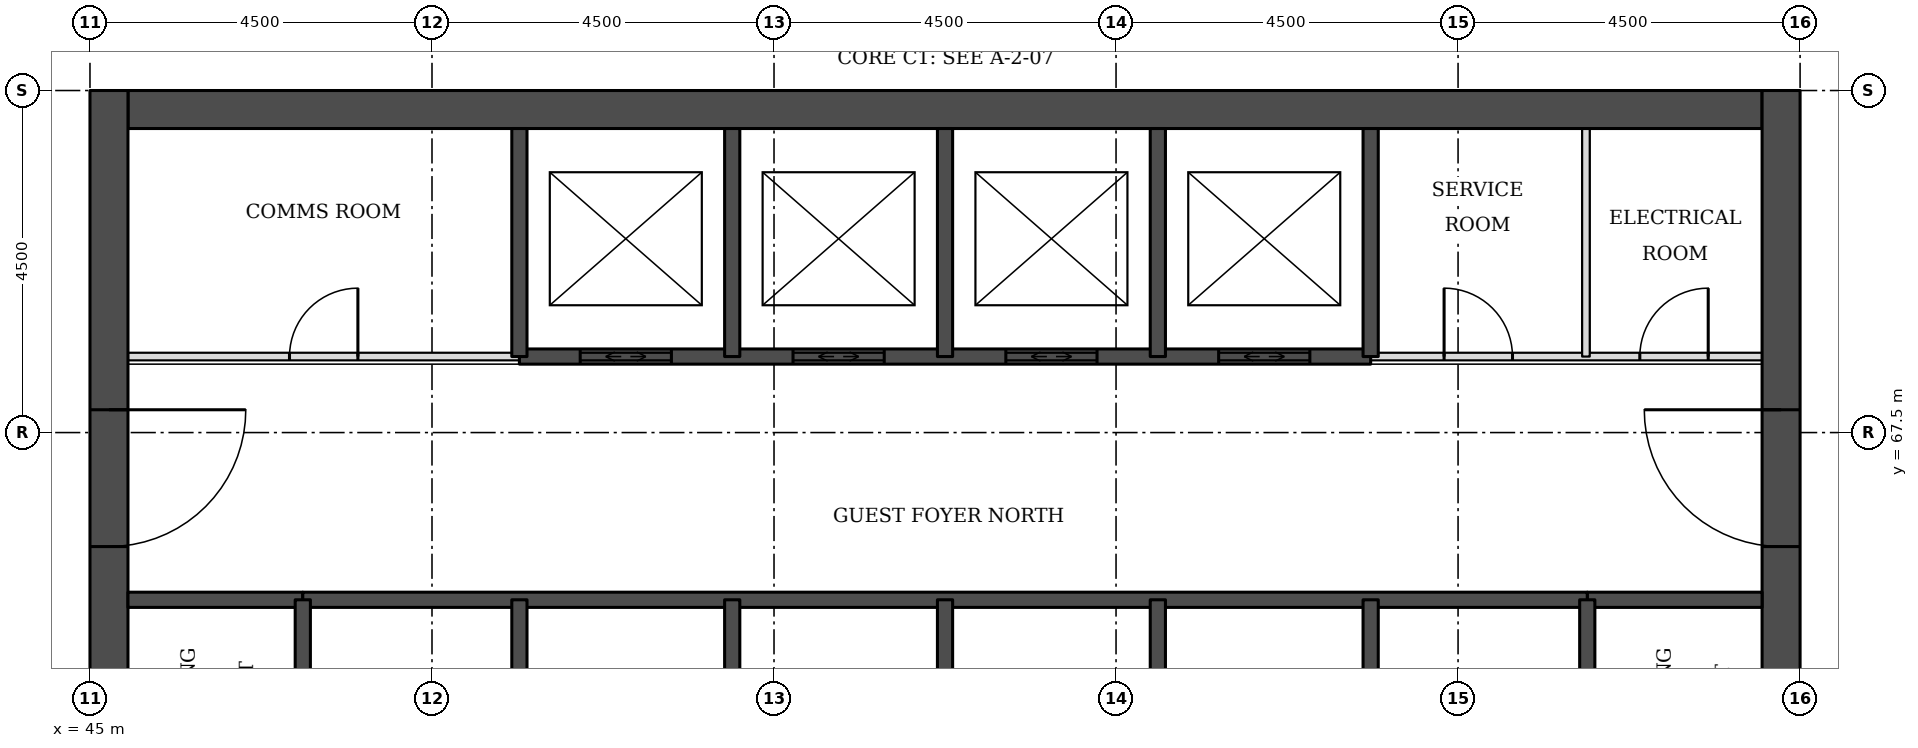
"""IFC4 building model, lengths in metres.
Left out: names, types, materials, properties, quantities, classifications, styles, units other than length and angle.
Written with IfcOpenShell. Run it as: python <this file> out.ifc"""

import sys

from ifc_helpers import new_model, si_unit, direction, frame, frame_2d, origin, place, context, subcontext, project, spatial, rectangle, extrude, element, fill, save


model = new_model("IFC4")
c1 = context("Model", 3, precision=1e-05, world=origin(), true_north=direction((0.0, 1.0)))
c2 = subcontext(c1, "Body", "Model", "MODEL_VIEW")
j1 = project(units=[si_unit("LENGTHUNIT", "METRE"), si_unit("PLANEANGLEUNIT", "RADIAN")], contexts=[c1])
p1 = place(None, origin())
s1 = spatial("IfcSite", under=j1, at=p1, CompositionType="ELEMENT")
p2 = place(p1, origin())
s2 = spatial("IfcBuilding", under=s1, at=p2, CompositionType="ELEMENT")
p3 = place(p2, frame((0.0, 0.0, 23.1)))
s3 = spatial("IfcBuildingStorey", under=s2, at=p3, CompositionType="ELEMENT", Elevation=23.1)
p4 = place(p3, frame((45.5, 71.75, 0.0), z_axis=(0.0, 0.0, 1.0), x_axis=(1.0, 0.0, 0.0)))
e1 = element("IfcWall", 1, at=p4, inside=s3, PredefinedType="SHEAR", context=c2, shape_type="SweptSolid", body=[
    extrude(rectangle(XDim=21.5, YDim=0.5, at=frame_2d((10.75, 0.0))), origin(), (0.0, 0.0, 1.0), 3.3),
])
p5 = place(p3, frame((45.25, 49.5, 0.0), z_axis=(0.0, 0.0, 1.0), x_axis=(0.0, 1.0, 0.0)))
e2 = element("IfcWall", 2, at=p5, inside=s3, PredefinedType="SHEAR", context=c2, shape_type="SweptSolid", body=[
    extrude(rectangle(XDim=22.5, YDim=0.5, at=frame_2d((11.25, 0.0))), origin(), (0.0, 0.0, 1.0), 3.3),
])
p6 = place(p5, frame((4.2, 0.0, 0.0)))
e3 = element("IfcOpeningElement", 3, at=p6, cuts=e2, PredefinedType="OPENING", context=c2, shape_type="SweptSolid", body=[
    extrude(rectangle(XDim=1.8, YDim=2.1, at=frame_2d((0.9, 1.05))), frame((0.0, 0.26, 0.0), z_axis=(0.0, -1.0, 0.0), x_axis=(1.0, 0.0, 0.0)), (0.0, 0.0, 1.0), 0.52),
])
p7 = place(p5, frame((6.9, 0.0, 0.0)))
e4 = element("IfcOpeningElement", 4, at=p7, cuts=e2, PredefinedType="OPENING", context=c2, shape_type="SweptSolid", body=[
    extrude(rectangle(XDim=1.1, YDim=2.1, at=frame_2d((0.55, 1.05))), frame((0.0, 0.26, 0.0), z_axis=(0.0, -1.0, 0.0), x_axis=(1.0, 0.0, 0.0)), (0.0, 0.0, 1.0), 0.52),
])
p8 = place(p5, frame((13.6, 0.0, 0.0)))
e5 = element("IfcOpeningElement", 5, at=p8, cuts=e2, PredefinedType="OPENING", context=c2, shape_type="SweptSolid", body=[
    extrude(rectangle(XDim=1.1, YDim=2.1, at=frame_2d((0.55, 1.05))), frame((0.0, 0.26, 0.0), z_axis=(0.0, -1.0, 0.0), x_axis=(1.0, 0.0, 0.0)), (0.0, 0.0, 1.0), 0.52),
])
p9 = place(p5, frame((16.5, 0.0, 0.0)))
e6 = element("IfcOpeningElement", 6, at=p9, cuts=e2, PredefinedType="OPENING", context=c2, shape_type="SweptSolid", body=[
    extrude(rectangle(XDim=1.8, YDim=2.1, at=frame_2d((0.9, 1.05))), frame((0.0, 0.26, 0.0), z_axis=(0.0, -1.0, 0.0), x_axis=(1.0, 0.0, 0.0)), (0.0, 0.0, 1.0), 0.52),
])
p10 = place(p3, frame((67.25, 49.5, 0.0), z_axis=(0.0, 0.0, 1.0), x_axis=(0.0, 1.0, 0.0)))
e7 = element("IfcWall", 7, at=p10, inside=s3, PredefinedType="SHEAR", context=c2, shape_type="SweptSolid", body=[
    extrude(rectangle(XDim=22.5, YDim=0.5, at=frame_2d((11.25, 0.0))), origin(), (0.0, 0.0, 1.0), 3.3),
])
p11 = place(p10, frame((4.2, 0.0, 0.0)))
e8 = element("IfcOpeningElement", 8, at=p11, cuts=e7, PredefinedType="OPENING", context=c2, shape_type="SweptSolid", body=[
    extrude(rectangle(XDim=1.8, YDim=2.1, at=frame_2d((0.9, 1.05))), frame((0.0, 0.26, 0.0), z_axis=(0.0, -1.0, 0.0), x_axis=(1.0, 0.0, 0.0)), (0.0, 0.0, 1.0), 0.52),
])
p12 = place(p10, frame((6.9, 0.0, 0.0)))
e9 = element("IfcOpeningElement", 9, at=p12, cuts=e7, PredefinedType="OPENING", context=c2, shape_type="SweptSolid", body=[
    extrude(rectangle(XDim=1.1, YDim=2.1, at=frame_2d((0.55, 1.05))), frame((0.0, 0.26, 0.0), z_axis=(0.0, -1.0, 0.0), x_axis=(1.0, 0.0, 0.0)), (0.0, 0.0, 1.0), 0.52),
])
p13 = place(p10, frame((13.6, 0.0, 0.0)))
e10 = element("IfcOpeningElement", 10, at=p13, cuts=e7, PredefinedType="OPENING", context=c2, shape_type="SweptSolid", body=[
    extrude(rectangle(XDim=1.1, YDim=2.1, at=frame_2d((0.55, 1.05))), frame((0.0, 0.26, 0.0), z_axis=(0.0, -1.0, 0.0), x_axis=(1.0, 0.0, 0.0)), (0.0, 0.0, 1.0), 0.52),
])
p14 = place(p10, frame((16.5, 0.0, 0.0)))
e11 = element("IfcOpeningElement", 11, at=p14, cuts=e7, PredefinedType="OPENING", context=c2, shape_type="SweptSolid", body=[
    extrude(rectangle(XDim=1.8, YDim=2.1, at=frame_2d((0.9, 1.05))), frame((0.0, 0.26, 0.0), z_axis=(0.0, -1.0, 0.0), x_axis=(1.0, 0.0, 0.0)), (0.0, 0.0, 1.0), 0.52),
])
for number, where, z_axis, x_axis in (
    (12, (45.5, 65.3, 0.0), (0.0, 0.0, 1.0), (1.0, 0.0, 0.0)),
    (13, (64.7, 65.3, 0.0), (0.0, 0.0, 1.0), (1.0, 0.0, 0.0)),
):
    element("IfcWall", number, at=place(p3, frame(where, z_axis=z_axis, x_axis=x_axis)), inside=s3, PredefinedType="SOLIDWALL", context=c2, shape_type="SweptSolid", body=[
        extrude(rectangle(XDim=2.3, YDim=0.2, at=frame_2d((1.15, 0.0))), origin(), (0.0, 0.0, 1.0), 3.08),
    ])
p15 = place(p3, frame((47.8, 65.3, 0.0), z_axis=(0.0, 0.0, 1.0), x_axis=(1.0, 0.0, 0.0)))
e14 = element("IfcWall", 14, at=p15, inside=s3, PredefinedType="SOLIDWALL", context=c2, shape_type="SweptSolid", body=[
    extrude(rectangle(XDim=16.9, YDim=0.2, at=frame_2d((8.45, 0.0))), origin(), (0.0, 0.0, 1.0), 3.08),
])
p16 = place(p3, frame((45.5, 68.5, 0.0), z_axis=(0.0, 0.0, 1.0), x_axis=(1.0, 0.0, 0.0)))
e15 = element("IfcWall", 15, at=p16, inside=s3, PredefinedType="PARTITIONING", context=c2, shape_type="SweptSolid", body=[
    extrude(rectangle(XDim=5.15, YDim=0.1, at=frame_2d((2.575, 0.0))), origin(), (0.0, 0.0, 1.0), 3.08),
])
p17 = place(p16, frame((2.125, 0.0, 0.0)))
e16 = element("IfcOpeningElement", 16, at=p17, cuts=e15, PredefinedType="OPENING", context=c2, shape_type="SweptSolid", body=[
    extrude(rectangle(XDim=0.9, YDim=2.1, at=frame_2d((0.45, 1.05))), frame((0.0, 0.06, 0.0), z_axis=(0.0, -1.0, 0.0), x_axis=(1.0, 0.0, 0.0)), (0.0, 0.0, 1.0), 0.12),
])
p18 = place(p3, frame((61.85, 68.5, 0.0), z_axis=(0.0, 0.0, 1.0), x_axis=(1.0, 0.0, 0.0)))
e17 = element("IfcWall", 17, at=p18, inside=s3, PredefinedType="PARTITIONING", context=c2, shape_type="SweptSolid", body=[
    extrude(rectangle(XDim=5.15, YDim=0.1, at=frame_2d((2.575, 0.0))), origin(), (0.0, 0.0, 1.0), 3.08),
])
p19 = place(p18, frame((3.541, 0.0, 0.0)))
e18 = element("IfcOpeningElement", 18, at=p19, cuts=e17, PredefinedType="OPENING", context=c2, shape_type="SweptSolid", body=[
    extrude(rectangle(XDim=0.9, YDim=2.1, at=frame_2d((0.45, 1.05))), frame((0.0, 0.06, 0.0), z_axis=(0.0, -1.0, 0.0), x_axis=(1.0, 0.0, 0.0)), (0.0, 0.0, 1.0), 0.12),
])
p20 = place(p18, frame((0.966, 0.0, 0.0)))
e19 = element("IfcOpeningElement", 19, at=p20, cuts=e17, PredefinedType="OPENING", context=c2, shape_type="SweptSolid", body=[
    extrude(rectangle(XDim=0.9, YDim=2.1, at=frame_2d((0.45, 1.05))), frame((0.0, 0.06, 0.0), z_axis=(0.0, -1.0, 0.0), x_axis=(1.0, 0.0, 0.0)), (0.0, 0.0, 1.0), 0.12),
])
p21 = place(p3, frame((50.65, 68.5, 0.0), z_axis=(0.0, 0.0, 1.0), x_axis=(1.0, 0.0, 0.0)))
e20 = element("IfcWall", 20, at=p21, inside=s3, PredefinedType="SOLIDWALL", context=c2, shape_type="SweptSolid", body=[
    extrude(rectangle(XDim=11.2, YDim=0.2, at=frame_2d((5.6, 0.0))), origin(), (0.0, 0.0, 1.0), 3.08),
])
p22 = place(p21, frame((0.8, 0.0, 0.0)))
e21 = element("IfcOpeningElement", 21, at=p22, cuts=e20, PredefinedType="OPENING", context=c2, shape_type="SweptSolid", body=[
    extrude(rectangle(XDim=1.2, YDim=2.1, at=frame_2d((0.6, 1.05))), frame((0.0, 0.11, 0.0), z_axis=(0.0, -1.0, 0.0), x_axis=(1.0, 0.0, 0.0)), (0.0, 0.0, 1.0), 0.22),
])
p23 = place(p21, frame((3.6, 0.0, 0.0)))
e22 = element("IfcOpeningElement", 22, at=p23, cuts=e20, PredefinedType="OPENING", context=c2, shape_type="SweptSolid", body=[
    extrude(rectangle(XDim=1.2, YDim=2.1, at=frame_2d((0.6, 1.05))), frame((0.0, 0.11, 0.0), z_axis=(0.0, -1.0, 0.0), x_axis=(1.0, 0.0, 0.0)), (0.0, 0.0, 1.0), 0.22),
])
p24 = place(p21, frame((6.4, 0.0, 0.0)))
e23 = element("IfcOpeningElement", 23, at=p24, cuts=e20, PredefinedType="OPENING", context=c2, shape_type="SweptSolid", body=[
    extrude(rectangle(XDim=1.2, YDim=2.1, at=frame_2d((0.6, 1.05))), frame((0.0, 0.11, 0.0), z_axis=(0.0, -1.0, 0.0), x_axis=(1.0, 0.0, 0.0)), (0.0, 0.0, 1.0), 0.22),
])
p25 = place(p21, frame((9.2, 0.0, 0.0)))
e24 = element("IfcOpeningElement", 24, at=p25, cuts=e20, PredefinedType="OPENING", context=c2, shape_type="SweptSolid", body=[
    extrude(rectangle(XDim=1.2, YDim=2.1, at=frame_2d((0.6, 1.05))), frame((0.0, 0.11, 0.0), z_axis=(0.0, -1.0, 0.0), x_axis=(1.0, 0.0, 0.0)), (0.0, 0.0, 1.0), 0.22),
])
p26 = place(p3, frame((47.8, 62.0, 0.0), z_axis=(0.0, 0.0, 1.0), x_axis=(0.0, 1.0, 0.0)))
e25 = element("IfcWall", 25, at=p26, inside=s3, PredefinedType="SOLIDWALL", context=c2, shape_type="SweptSolid", body=[
    extrude(rectangle(XDim=3.3, YDim=0.2, at=frame_2d((1.65, 0.0))), origin(), (0.0, 0.0, 1.0), 3.08),
])
p27 = place(p26, frame((1.1, 0.0, 0.0)))
e26 = element("IfcOpeningElement", 26, at=p27, cuts=e25, PredefinedType="OPENING", context=c2, shape_type="SweptSolid", body=[
    extrude(rectangle(XDim=1.1, YDim=2.1, at=frame_2d((0.55, 1.05))), frame((0.0, 0.11, 0.0), z_axis=(0.0, -1.0, 0.0), x_axis=(1.0, 0.0, 0.0)), (0.0, 0.0, 1.0), 0.22),
])
p28 = place(p3, frame((50.65, 62.0, 0.0), z_axis=(0.0, 0.0, 1.0), x_axis=(0.0, 1.0, 0.0)))
e27 = element("IfcWall", 27, at=p28, inside=s3, PredefinedType="SOLIDWALL", context=c2, shape_type="SweptSolid", body=[
    extrude(rectangle(XDim=3.3, YDim=0.2, at=frame_2d((1.65, 0.0))), origin(), (0.0, 0.0, 1.0), 3.08),
])
p29 = place(p3, frame((50.65, 68.5, 0.0), z_axis=(0.0, 0.0, 1.0), x_axis=(0.0, 1.0, 0.0)))
e28 = element("IfcWall", 28, at=p29, inside=s3, PredefinedType="SOLIDWALL", context=c2, shape_type="SweptSolid", body=[
    extrude(rectangle(XDim=3.0, YDim=0.2, at=frame_2d((1.5, 0.0))), origin(), (0.0, 0.0, 1.0), 3.08),
])
p30 = place(p3, frame((53.45, 62.5, 0.0), z_axis=(0.0, 0.0, 1.0), x_axis=(0.0, 1.0, 0.0)))
e29 = element("IfcWall", 29, at=p30, inside=s3, PredefinedType="SOLIDWALL", context=c2, shape_type="SweptSolid", body=[
    extrude(rectangle(XDim=2.8, YDim=0.2, at=frame_2d((1.4, 0.0))), origin(), (0.0, 0.0, 1.0), 3.08),
])
p31 = place(p3, frame((53.45, 68.5, 0.0), z_axis=(0.0, 0.0, 1.0), x_axis=(0.0, 1.0, 0.0)))
e30 = element("IfcWall", 30, at=p31, inside=s3, PredefinedType="SOLIDWALL", context=c2, shape_type="SweptSolid", body=[
    extrude(rectangle(XDim=3.0, YDim=0.2, at=frame_2d((1.5, 0.0))), origin(), (0.0, 0.0, 1.0), 3.08),
])
p32 = place(p3, frame((56.25, 62.5, 0.0), z_axis=(0.0, 0.0, 1.0), x_axis=(0.0, 1.0, 0.0)))
e31 = element("IfcWall", 31, at=p32, inside=s3, PredefinedType="SOLIDWALL", context=c2, shape_type="SweptSolid", body=[
    extrude(rectangle(XDim=2.8, YDim=0.2, at=frame_2d((1.4, 0.0))), origin(), (0.0, 0.0, 1.0), 3.08),
])
p33 = place(p3, frame((56.25, 68.5, 0.0), z_axis=(0.0, 0.0, 1.0), x_axis=(0.0, 1.0, 0.0)))
e32 = element("IfcWall", 32, at=p33, inside=s3, PredefinedType="SOLIDWALL", context=c2, shape_type="SweptSolid", body=[
    extrude(rectangle(XDim=3.0, YDim=0.2, at=frame_2d((1.5, 0.0))), origin(), (0.0, 0.0, 1.0), 3.08),
])
p34 = place(p3, frame((59.05, 62.5, 0.0), z_axis=(0.0, 0.0, 1.0), x_axis=(0.0, 1.0, 0.0)))
e33 = element("IfcWall", 33, at=p34, inside=s3, PredefinedType="SOLIDWALL", context=c2, shape_type="SweptSolid", body=[
    extrude(rectangle(XDim=2.8, YDim=0.2, at=frame_2d((1.4, 0.0))), origin(), (0.0, 0.0, 1.0), 3.08),
])
p35 = place(p3, frame((59.05, 68.5, 0.0), z_axis=(0.0, 0.0, 1.0), x_axis=(0.0, 1.0, 0.0)))
e34 = element("IfcWall", 34, at=p35, inside=s3, PredefinedType="SOLIDWALL", context=c2, shape_type="SweptSolid", body=[
    extrude(rectangle(XDim=3.0, YDim=0.2, at=frame_2d((1.5, 0.0))), origin(), (0.0, 0.0, 1.0), 3.08),
])
p36 = place(p3, frame((61.85, 62.0, 0.0), z_axis=(0.0, 0.0, 1.0), x_axis=(0.0, 1.0, 0.0)))
e35 = element("IfcWall", 35, at=p36, inside=s3, PredefinedType="SOLIDWALL", context=c2, shape_type="SweptSolid", body=[
    extrude(rectangle(XDim=3.3, YDim=0.2, at=frame_2d((1.65, 0.0))), origin(), (0.0, 0.0, 1.0), 3.08),
])
p37 = place(p3, frame((61.85, 68.5, 0.0), z_axis=(0.0, 0.0, 1.0), x_axis=(0.0, 1.0, 0.0)))
e36 = element("IfcWall", 36, at=p37, inside=s3, PredefinedType="SOLIDWALL", context=c2, shape_type="SweptSolid", body=[
    extrude(rectangle(XDim=3.0, YDim=0.2, at=frame_2d((1.5, 0.0))), origin(), (0.0, 0.0, 1.0), 3.08),
])
p38 = place(p3, frame((64.683, 68.5, 0.0), z_axis=(0.0, 0.0, 1.0), x_axis=(0.0, 1.0, 0.0)))
e37 = element("IfcWall", 37, at=p38, inside=s3, PredefinedType="PARTITIONING", context=c2, shape_type="SweptSolid", body=[
    extrude(rectangle(XDim=3.0, YDim=0.1, at=frame_2d((1.5, 0.0))), origin(), (0.0, 0.0, 1.0), 3.08),
])
p39 = place(p3, frame((64.7, 62.0, 0.0), z_axis=(0.0, 0.0, 1.0), x_axis=(0.0, 1.0, 0.0)))
e38 = element("IfcWall", 38, at=p39, inside=s3, PredefinedType="SOLIDWALL", context=c2, shape_type="SweptSolid", body=[
    extrude(rectangle(XDim=3.3, YDim=0.2, at=frame_2d((1.65, 0.0))), origin(), (0.0, 0.0, 1.0), 3.08),
])
p40 = place(p39, frame((1.1, 0.0, 0.0)))
e39 = element("IfcOpeningElement", 39, at=p40, cuts=e38, PredefinedType="OPENING", context=c2, shape_type="SweptSolid", body=[
    extrude(rectangle(XDim=1.1, YDim=2.1, at=frame_2d((0.55, 1.05))), frame((0.0, 0.11, 0.0), z_axis=(0.0, -1.0, 0.0), x_axis=(1.0, 0.0, 0.0)), (0.0, 0.0, 1.0), 0.22),
])
p41 = place(p22, origin())
e40 = element("IfcDoor", 40, at=p41, inside=s3, OperationType="DOUBLE_DOOR_SLIDING", PredefinedType="DOOR", context=c2, shape_type="SweptSolid", body=[
    extrude(rectangle(XDim=1.2, YDim=2.1, at=frame_2d((0.6, 1.05))), frame((0.0, 0.025, 0.0), z_axis=(0.0, -1.0, 0.0), x_axis=(1.0, 0.0, 0.0)), (0.0, 0.0, 1.0), 0.05),
])
fill(e21, e40)
p42 = place(p23, origin())
e41 = element("IfcDoor", 41, at=p42, inside=s3, OperationType="DOUBLE_DOOR_SLIDING", PredefinedType="DOOR", context=c2, shape_type="SweptSolid", body=[
    extrude(rectangle(XDim=1.2, YDim=2.1, at=frame_2d((0.6, 1.05))), frame((0.0, 0.025, 0.0), z_axis=(0.0, -1.0, 0.0), x_axis=(1.0, 0.0, 0.0)), (0.0, 0.0, 1.0), 0.05),
])
fill(e22, e41)
p43 = place(p24, origin())
e42 = element("IfcDoor", 42, at=p43, inside=s3, OperationType="DOUBLE_DOOR_SLIDING", PredefinedType="DOOR", context=c2, shape_type="SweptSolid", body=[
    extrude(rectangle(XDim=1.2, YDim=2.1, at=frame_2d((0.6, 1.05))), frame((0.0, 0.025, 0.0), z_axis=(0.0, -1.0, 0.0), x_axis=(1.0, 0.0, 0.0)), (0.0, 0.0, 1.0), 0.05),
])
fill(e23, e42)
p44 = place(p25, origin())
e43 = element("IfcDoor", 43, at=p44, inside=s3, OperationType="DOUBLE_DOOR_SLIDING", PredefinedType="DOOR", context=c2, shape_type="SweptSolid", body=[
    extrude(rectangle(XDim=1.2, YDim=2.1, at=frame_2d((0.6, 1.05))), frame((0.0, 0.025, 0.0), z_axis=(0.0, -1.0, 0.0), x_axis=(1.0, 0.0, 0.0)), (0.0, 0.0, 1.0), 0.05),
])
fill(e24, e43)
p45 = place(p9, frame((1.8, 0.0, 0.0), z_axis=(0.0, 0.0, 1.0), x_axis=(-1.0, 0.0, 0.0)))
e44 = element("IfcDoor", 44, at=p45, inside=s3, OperationType="SINGLE_SWING_LEFT", PredefinedType="DOOR", context=c2, shape_type="SweptSolid", body=[
    extrude(rectangle(XDim=1.8, YDim=2.1, at=frame_2d((0.9, 1.05))), frame((0.0, 0.025, 0.0), z_axis=(0.0, -1.0, 0.0), x_axis=(1.0, 0.0, 0.0)), (0.0, 0.0, 1.0), 0.05),
])
fill(e6, e44)
p46 = place(p14, origin())
e45 = element("IfcDoor", 45, at=p46, inside=s3, OperationType="SINGLE_SWING_RIGHT", PredefinedType="DOOR", context=c2, shape_type="SweptSolid", body=[
    extrude(rectangle(XDim=1.8, YDim=2.1, at=frame_2d((0.9, 1.05))), frame((0.0, 0.025, 0.0), z_axis=(0.0, -1.0, 0.0), x_axis=(1.0, 0.0, 0.0)), (0.0, 0.0, 1.0), 0.05),
])
fill(e11, e45)
p47 = place(p19, origin())
e46 = element("IfcDoor", 46, at=p47, inside=s3, OperationType="SINGLE_SWING_RIGHT", PredefinedType="DOOR", context=c2, shape_type="SweptSolid", body=[
    extrude(rectangle(XDim=0.9, YDim=2.1, at=frame_2d((0.45, 1.05))), frame((0.0, 0.025, 0.0), z_axis=(0.0, -1.0, 0.0), x_axis=(1.0, 0.0, 0.0)), (0.0, 0.0, 1.0), 0.05),
])
fill(e18, e46)
p48 = place(p20, origin())
e47 = element("IfcDoor", 47, at=p48, inside=s3, OperationType="SINGLE_SWING_LEFT", PredefinedType="DOOR", context=c2, shape_type="SweptSolid", body=[
    extrude(rectangle(XDim=0.9, YDim=2.1, at=frame_2d((0.45, 1.05))), frame((0.0, 0.025, 0.0), z_axis=(0.0, -1.0, 0.0), x_axis=(1.0, 0.0, 0.0)), (0.0, 0.0, 1.0), 0.05),
])
fill(e19, e47)
p49 = place(p17, origin())
e48 = element("IfcDoor", 48, at=p49, inside=s3, OperationType="SINGLE_SWING_RIGHT", PredefinedType="DOOR", context=c2, shape_type="SweptSolid", body=[
    extrude(rectangle(XDim=0.9, YDim=2.1, at=frame_2d((0.45, 1.05))), frame((0.0, 0.025, 0.0), z_axis=(0.0, -1.0, 0.0), x_axis=(1.0, 0.0, 0.0)), (0.0, 0.0, 1.0), 0.05),
])
fill(e16, e48)
save(model, sys.argv[1])
